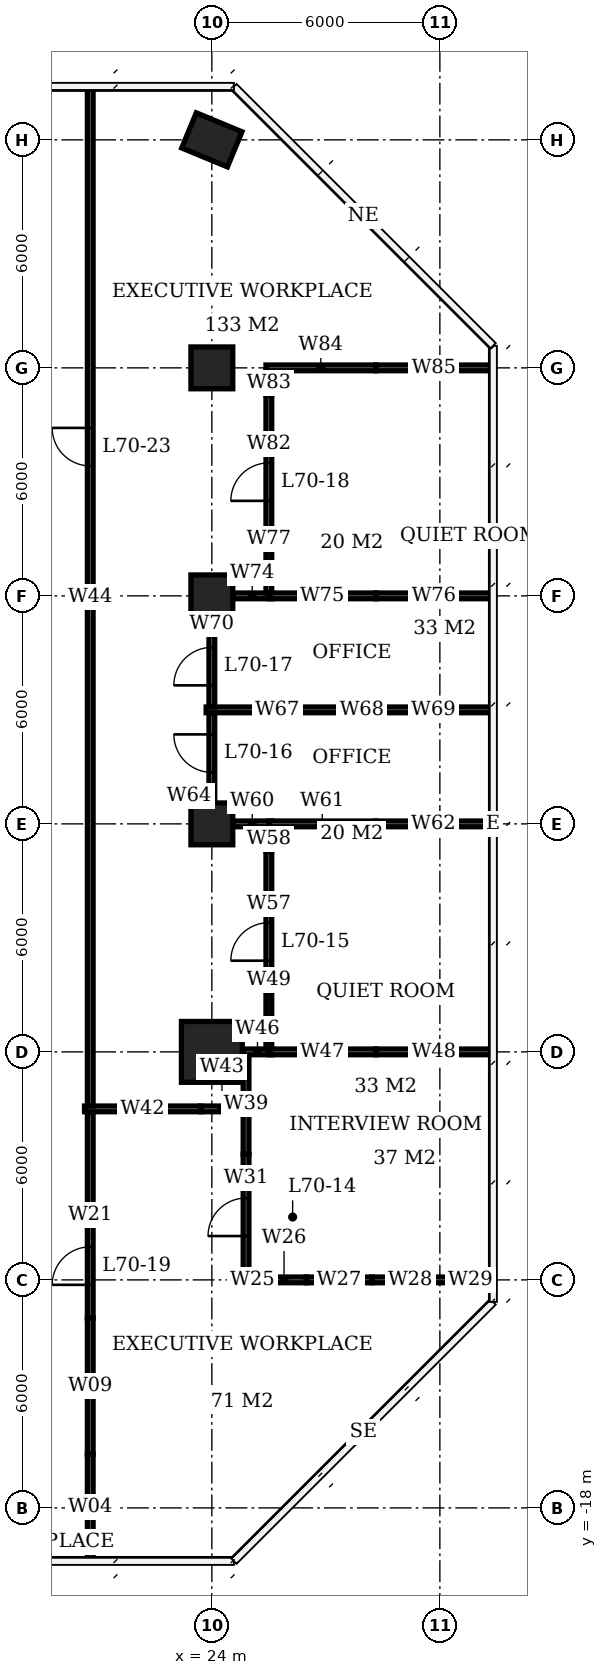
"""IFC4 building model, lengths in metres.
Left out: names, types, materials, properties, quantities, classifications, styles, units other than length and angle.
Written with IfcOpenShell. Run it as: python <this file> out.ifc"""

import sys

from ifc_helpers import new_model, si_unit, direction, frame, frame_2d, origin, origin_2d, place, context, subcontext, project, spatial, rectangle, extrude, element, fill, save


model = new_model("IFC4")
c1 = context("Model", 3, precision=1e-05, world=origin(), true_north=direction((0.0, 1.0)))
c2 = subcontext(c1, "Body", "Model", "MODEL_VIEW")
j1 = project(units=[si_unit("LENGTHUNIT", "METRE"), si_unit("PLANEANGLEUNIT", "RADIAN")], contexts=[c1])
p1 = place(None, origin())
s1 = spatial("IfcSite", under=j1, at=p1, CompositionType="ELEMENT")
p2 = place(p1, origin())
s2 = spatial("IfcBuilding", under=s1, at=p2, CompositionType="ELEMENT")
p3 = place(p2, frame((0.0, 0.0, 284.0)))
s3 = spatial("IfcBuildingStorey", under=s2, at=p3, CompositionType="ELEMENT", Elevation=284.0)
p4 = place(p3, frame((24.0, -6.0, 0.0), z_axis=(0.0, 0.0, 1.0), x_axis=(1.0, 0.0, 0.0)))
e1 = element("IfcColumn", 1, at=p4, inside=s3, PredefinedType="COLUMN", context=c2, shape_type="SweptSolid", body=[
    extrude(rectangle(XDim=1.6, YDim=1.6, at=origin_2d()), origin(), (0.0, 0.0, 1.0), 3.9),
])
for number, where, z_axis, x_axis in (
    (2, (24.0, 0.0, 0.0), (0.0, 0.0, 1.0), (1.0, 0.0, 0.0)),
    (3, (24.0, 6.0, 0.0), (0.0, 0.0, 1.0), (1.0, 0.0, 0.0)),
    (4, (24.0, 12.0, 0.0), (0.0, 0.0, 1.0), (1.0, 0.0, 0.0)),
):
    element("IfcColumn", number, at=place(p3, frame(where, z_axis=z_axis, x_axis=x_axis)), inside=s3, PredefinedType="COLUMN", context=c2, shape_type="SweptSolid", body=[
        extrude(rectangle(XDim=1.1, YDim=1.1, at=origin_2d()), origin(), (0.0, 0.0, 1.0), 3.9),
    ])
p5 = place(p3, frame((24.0, 18.0, 0.0), z_axis=(0.0, 0.0, 1.0), x_axis=(0.923879532511, -0.382683432365, 0.0)))
e5 = element("IfcColumn", 5, at=p5, inside=s3, PredefinedType="COLUMN", context=c2, shape_type="SweptSolid", body=[
    extrude(rectangle(XDim=1.3, YDim=1.0, at=origin_2d()), origin(), (0.0, 0.0, 1.0), 3.9),
])
p6 = place(p3, frame((24.825, -12.0, 0.0), z_axis=(0.0, 0.0, 1.0), x_axis=(1.0, 0.0, 0.0)))
e6 = element("IfcWall", 6, at=p6, inside=s3, PredefinedType="PARTITIONING", context=c2, shape_type="SweptSolid", body=[
    extrude(rectangle(XDim=0.485, YDim=0.15, at=frame_2d((0.243, 0.0))), origin(), (0.0, 0.0, 1.0), 3.65),
])
p7 = place(p3, frame((25.31, -12.0, 0.0), z_axis=(0.0, 0.0, 1.0), x_axis=(1.0, 0.0, 0.0)))
e7 = element("IfcWall", 7, at=p7, inside=s3, PredefinedType="PARTITIONING", context=c2, shape_type="SweptSolid", body=[
    extrude(rectangle(XDim=1.18, YDim=0.15, at=frame_2d((0.59, 0.0))), origin(), (0.0, 0.0, 1.0), 2.65),
])
p8 = place(p3, frame((26.49, -12.0, 0.0), z_axis=(0.0, 0.0, 1.0), x_axis=(1.0, 0.0, 0.0)))
e8 = element("IfcWall", 8, at=p8, inside=s3, PredefinedType="PARTITIONING", context=c2, shape_type="SweptSolid", body=[
    extrude(rectangle(XDim=1.718, YDim=0.15, at=frame_2d((0.859, 0.0))), origin(), (0.0, 0.0, 1.0), 3.65),
])
p9 = place(p3, frame((28.208, -12.0, 0.0), z_axis=(0.0, 0.0, 1.0), x_axis=(1.0, 0.0, 0.0)))
e9 = element("IfcWall", 9, at=p9, inside=s3, PredefinedType="PARTITIONING", context=c2, shape_type="SweptSolid", body=[
    extrude(rectangle(XDim=2.029, YDim=0.15, at=frame_2d((1.015, 0.0))), origin(), (0.0, 0.0, 1.0), 2.65),
])
p10 = place(p3, frame((30.237, -12.0, 0.0), z_axis=(0.0, 0.0, 1.0), x_axis=(1.0, 0.0, 0.0)))
e10 = element("IfcWall", 10, at=p10, inside=s3, PredefinedType="PARTITIONING", context=c2, shape_type="SweptSolid", body=[
    extrude(rectangle(XDim=1.138, YDim=0.15, at=frame_2d((0.569, 0.0))), origin(), (0.0, 0.0, 1.0), 3.65),
])
p11 = place(p3, frame((24.825, -6.0, 0.0), z_axis=(0.0, 0.0, 1.0), x_axis=(1.0, 0.0, 0.0)))
e11 = element("IfcWall", 11, at=p11, inside=s3, PredefinedType="PARTITIONING", context=c2, shape_type="SweptSolid", body=[
    extrude(rectangle(XDim=0.75, YDim=0.15, at=frame_2d((0.375, 0.0))), origin(), (0.0, 0.0, 1.0), 2.65),
])
p12 = place(p3, frame((25.5, -6.0, 0.0), z_axis=(0.0, 0.0, 1.0), x_axis=(1.0, 0.0, 0.0)))
e12 = element("IfcWall", 12, at=p12, inside=s3, PredefinedType="PARTITIONING", context=c2, shape_type="SweptSolid", body=[
    extrude(rectangle(XDim=2.81, YDim=0.15, at=frame_2d((1.405, 0.0))), origin(), (0.0, 0.0, 1.0), 2.65),
])
p13 = place(p3, frame((28.31, -6.0, 0.0), z_axis=(0.0, 0.0, 1.0), x_axis=(1.0, 0.0, 0.0)))
e13 = element("IfcWall", 13, at=p13, inside=s3, PredefinedType="PARTITIONING", context=c2, shape_type="SweptSolid", body=[
    extrude(rectangle(XDim=3.065, YDim=0.15, at=frame_2d((1.532, 0.0))), origin(), (0.0, 0.0, 1.0), 3.65),
])
p14 = place(p3, frame((24.55, 0.0, 0.0), z_axis=(0.0, 0.0, 1.0), x_axis=(1.0, 0.0, 0.0)))
e14 = element("IfcWall", 14, at=p14, inside=s3, PredefinedType="PARTITIONING", context=c2, shape_type="SweptSolid", body=[
    extrude(rectangle(XDim=1.025, YDim=0.15, at=frame_2d((0.512, 0.0))), origin(), (0.0, 0.0, 1.0), 2.65),
])
p15 = place(p3, frame((25.5, 0.0, 0.0), z_axis=(0.0, 0.0, 1.0), x_axis=(1.0, 0.0, 0.0)))
e15 = element("IfcWall", 15, at=p15, inside=s3, PredefinedType="PARTITIONING", context=c2, shape_type="SweptSolid", body=[
    extrude(rectangle(XDim=2.81, YDim=0.15, at=frame_2d((1.405, 0.0))), origin(), (0.0, 0.0, 1.0), 2.65),
])
p16 = place(p3, frame((28.31, 0.0, 0.0), z_axis=(0.0, 0.0, 1.0), x_axis=(1.0, 0.0, 0.0)))
e16 = element("IfcWall", 16, at=p16, inside=s3, PredefinedType="PARTITIONING", context=c2, shape_type="SweptSolid", body=[
    extrude(rectangle(XDim=3.04, YDim=0.15, at=frame_2d((1.52, 0.0))), origin(), (0.0, 0.0, 1.0), 3.65),
])
p17 = place(p3, frame((23.85, 3.0, 0.0), z_axis=(0.0, 0.0, 1.0), x_axis=(1.0, 0.0, 0.0)))
e17 = element("IfcWall", 17, at=p17, inside=s3, PredefinedType="PARTITIONING", context=c2, shape_type="SweptSolid", body=[
    extrude(rectangle(XDim=3.74, YDim=0.15, at=frame_2d((1.87, 0.0))), origin(), (0.0, 0.0, 1.0), 3.65),
])
p18 = place(p3, frame((27.59, 3.0, 0.0), z_axis=(0.0, 0.0, 1.0), x_axis=(1.0, 0.0, 0.0)))
e18 = element("IfcWall", 18, at=p18, inside=s3, PredefinedType="PARTITIONING", context=c2, shape_type="SweptSolid", body=[
    extrude(rectangle(XDim=0.72, YDim=0.15, at=frame_2d((0.36, 0.0))), origin(), (0.0, 0.0, 1.0), 2.65),
])
p19 = place(p3, frame((28.31, 3.0, 0.0), z_axis=(0.0, 0.0, 1.0), x_axis=(1.0, 0.0, 0.0)))
e19 = element("IfcWall", 19, at=p19, inside=s3, PredefinedType="PARTITIONING", context=c2, shape_type="SweptSolid", body=[
    extrude(rectangle(XDim=3.04, YDim=0.15, at=frame_2d((1.52, 0.0))), origin(), (0.0, 0.0, 1.0), 3.65),
])
p20 = place(p3, frame((24.55, 6.0, 0.0), z_axis=(0.0, 0.0, 1.0), x_axis=(1.0, 0.0, 0.0)))
e20 = element("IfcWall", 20, at=p20, inside=s3, PredefinedType="PARTITIONING", context=c2, shape_type="SweptSolid", body=[
    extrude(rectangle(XDim=1.025, YDim=0.15, at=frame_2d((0.512, 0.0))), origin(), (0.0, 0.0, 1.0), 2.65),
])
p21 = place(p3, frame((25.5, 6.0, 0.0), z_axis=(0.0, 0.0, 1.0), x_axis=(1.0, 0.0, 0.0)))
e21 = element("IfcWall", 21, at=p21, inside=s3, PredefinedType="PARTITIONING", context=c2, shape_type="SweptSolid", body=[
    extrude(rectangle(XDim=2.81, YDim=0.15, at=frame_2d((1.405, 0.0))), origin(), (0.0, 0.0, 1.0), 2.65),
])
p22 = place(p3, frame((28.31, 6.0, 0.0), z_axis=(0.0, 0.0, 1.0), x_axis=(1.0, 0.0, 0.0)))
e22 = element("IfcWall", 22, at=p22, inside=s3, PredefinedType="PARTITIONING", context=c2, shape_type="SweptSolid", body=[
    extrude(rectangle(XDim=3.065, YDim=0.15, at=frame_2d((1.532, 0.0))), origin(), (0.0, 0.0, 1.0), 3.65),
])
p23 = place(p3, frame((25.425, 12.0, 0.0), z_axis=(0.0, 0.0, 1.0), x_axis=(1.0, 0.0, 0.0)))
e23 = element("IfcWall", 23, at=p23, inside=s3, PredefinedType="PARTITIONING", context=c2, shape_type="SweptSolid", body=[
    extrude(rectangle(XDim=2.885, YDim=0.15, at=frame_2d((1.442, 0.0))), origin(), (0.0, 0.0, 1.0), 2.65),
])
p24 = place(p3, frame((28.31, 12.0, 0.0), z_axis=(0.0, 0.0, 1.0), x_axis=(1.0, 0.0, 0.0)))
e24 = element("IfcWall", 24, at=p24, inside=s3, PredefinedType="PARTITIONING", context=c2, shape_type="SweptSolid", body=[
    extrude(rectangle(XDim=3.065, YDim=0.15, at=frame_2d((1.532, 0.0))), origin(), (0.0, 0.0, 1.0), 3.65),
])
p25 = place(p3, frame((24.0, 0.56, 0.0), z_axis=(0.0, 0.0, 1.0), x_axis=(0.0, 1.0, 0.0)))
e25 = element("IfcWall", 25, at=p25, inside=s3, PredefinedType="PARTITIONING", context=c2, shape_type="SweptSolid", body=[
    extrude(rectangle(XDim=2.365, YDim=0.15, at=frame_2d((1.183, 0.0))), origin(), (0.0, 0.0, 1.0), 3.65),
])
p26 = place(p25, frame((0.795, 0.0, 0.0)))
e26 = element("IfcOpeningElement", 26, at=p26, cuts=e25, PredefinedType="OPENING", context=c2, shape_type="SweptSolid", body=[
    extrude(rectangle(XDim=1.0, YDim=2.4, at=frame_2d((0.5, 1.2))), frame((0.0, 0.085, 0.0), z_axis=(0.0, -1.0, 0.0), x_axis=(1.0, 0.0, 0.0)), (0.0, 0.0, 1.0), 0.17),
])
p27 = place(p3, frame((24.0, 3.075, 0.0), z_axis=(0.0, 0.0, 1.0), x_axis=(0.0, 1.0, 0.0)))
e27 = element("IfcWall", 27, at=p27, inside=s3, PredefinedType="PARTITIONING", context=c2, shape_type="SweptSolid", body=[
    extrude(rectangle(XDim=2.365, YDim=0.15, at=frame_2d((1.183, 0.0))), origin(), (0.0, 0.0, 1.0), 3.65),
])
p28 = place(p27, frame((0.57, 0.0, 0.0)))
e28 = element("IfcOpeningElement", 28, at=p28, cuts=e27, PredefinedType="OPENING", context=c2, shape_type="SweptSolid", body=[
    extrude(rectangle(XDim=1.0, YDim=2.4, at=frame_2d((0.5, 1.2))), frame((0.0, 0.085, 0.0), z_axis=(0.0, -1.0, 0.0), x_axis=(1.0, 0.0, 0.0)), (0.0, 0.0, 1.0), 0.17),
])
p29 = place(p3, frame((24.9, -11.925, 0.0), z_axis=(0.0, 0.0, 1.0), x_axis=(0.0, 1.0, 0.0)))
e29 = element("IfcWall", 29, at=p29, inside=s3, PredefinedType="PARTITIONING", context=c2, shape_type="SweptSolid", body=[
    extrude(rectangle(XDim=3.233, YDim=0.15, at=frame_2d((1.616, 0.0))), origin(), (0.0, 0.0, 1.0), 3.65),
])
p30 = place(p29, frame((1.079, 0.0, 0.0)))
e30 = element("IfcOpeningElement", 30, at=p30, cuts=e29, PredefinedType="OPENING", context=c2, shape_type="SweptSolid", body=[
    extrude(rectangle(XDim=1.0, YDim=2.4, at=frame_2d((0.5, 1.2))), frame((0.0, 0.085, 0.0), z_axis=(0.0, -1.0, 0.0), x_axis=(1.0, 0.0, 0.0)), (0.0, 0.0, 1.0), 0.17),
])
p31 = place(p3, frame((24.9, -8.692, 0.0), z_axis=(0.0, 0.0, 1.0), x_axis=(0.0, 1.0, 0.0)))
e31 = element("IfcWall", 31, at=p31, inside=s3, PredefinedType="PARTITIONING", context=c2, shape_type="SweptSolid", body=[
    extrude(rectangle(XDim=2.617, YDim=0.15, at=frame_2d((1.309, 0.0))), origin(), (0.0, 0.0, 1.0), 2.65),
])
p32 = place(p3, frame((25.5, -5.925, 0.0), z_axis=(0.0, 0.0, 1.0), x_axis=(0.0, 1.0, 0.0)))
e32 = element("IfcWall", 32, at=p32, inside=s3, PredefinedType="PARTITIONING", context=c2, shape_type="SweptSolid", body=[
    extrude(rectangle(XDim=0.435, YDim=0.15, at=frame_2d((0.218, 0.0))), origin(), (0.0, 0.0, 1.0), 2.65),
])
p33 = place(p3, frame((25.5, -5.49, 0.0), z_axis=(0.0, 0.0, 1.0), x_axis=(0.0, 1.0, 0.0)))
e33 = element("IfcWall", 33, at=p33, inside=s3, PredefinedType="PARTITIONING", context=c2, shape_type="SweptSolid", body=[
    extrude(rectangle(XDim=4.78, YDim=0.15, at=frame_2d((2.39, 0.0))), origin(), (0.0, 0.0, 1.0), 3.65),
])
p34 = place(p33, frame((1.89, 0.0, 0.0)))
e34 = element("IfcOpeningElement", 34, at=p34, cuts=e33, PredefinedType="OPENING", context=c2, shape_type="SweptSolid", body=[
    extrude(rectangle(XDim=1.0, YDim=2.4, at=frame_2d((0.5, 1.2))), frame((0.0, 0.085, 0.0), z_axis=(0.0, -1.0, 0.0), x_axis=(1.0, 0.0, 0.0)), (0.0, 0.0, 1.0), 0.17),
])
for number, where, z_axis, x_axis in (
    (35, (25.5, -0.71, 0.0), (0.0, 0.0, 1.0), (0.0, 1.0, 0.0)),
    (36, (25.5, 6.075, 0.0), (0.0, 0.0, 1.0), (0.0, 1.0, 0.0)),
):
    element("IfcWall", number, at=place(p3, frame(where, z_axis=z_axis, x_axis=x_axis)), inside=s3, PredefinedType="PARTITIONING", context=c2, shape_type="SweptSolid", body=[
        extrude(rectangle(XDim=0.635, YDim=0.15, at=frame_2d((0.317, 0.0))), origin(), (0.0, 0.0, 1.0), 2.65),
    ])
p35 = place(p3, frame((25.5, 6.71, 0.0), z_axis=(0.0, 0.0, 1.0), x_axis=(0.0, 1.0, 0.0)))
e37 = element("IfcWall", 37, at=p35, inside=s3, PredefinedType="PARTITIONING", context=c2, shape_type="SweptSolid", body=[
    extrude(rectangle(XDim=4.58, YDim=0.15, at=frame_2d((2.29, 0.0))), origin(), (0.0, 0.0, 1.0), 3.65),
])
p36 = place(p35, frame((1.79, 0.0, 0.0)))
e38 = element("IfcOpeningElement", 38, at=p36, cuts=e37, PredefinedType="OPENING", context=c2, shape_type="SweptSolid", body=[
    extrude(rectangle(XDim=1.0, YDim=2.4, at=frame_2d((0.5, 1.2))), frame((0.0, 0.085, 0.0), z_axis=(0.0, -1.0, 0.0), x_axis=(1.0, 0.0, 0.0)), (0.0, 0.0, 1.0), 0.17),
])
p37 = place(p3, frame((25.5, 11.29, 0.0), z_axis=(0.0, 0.0, 1.0), x_axis=(0.0, 1.0, 0.0)))
e39 = element("IfcWall", 39, at=p37, inside=s3, PredefinedType="PARTITIONING", context=c2, shape_type="SweptSolid", body=[
    extrude(rectangle(XDim=0.635, YDim=0.15, at=frame_2d((0.317, 0.0))), origin(), (0.0, 0.0, 1.0), 2.65),
])
p38 = place(p3, frame((20.8, -19.375, 0.0), z_axis=(0.0, 0.0, 1.0), x_axis=(0.0, 1.0, 0.0)))
e40 = element("IfcWall", 40, at=p38, inside=s3, PredefinedType="PARTITIONING", context=c2, shape_type="SweptSolid", body=[
    extrude(rectangle(XDim=2.783, YDim=0.15, at=frame_2d((1.392, 0.0))), origin(), (0.0, 0.0, 1.0), 3.65),
])
p39 = place(p3, frame((20.8, -16.592, 0.0), z_axis=(0.0, 0.0, 1.0), x_axis=(0.0, 1.0, 0.0)))
e41 = element("IfcWall", 41, at=p39, inside=s3, PredefinedType="PARTITIONING", context=c2, shape_type="SweptSolid", body=[
    extrude(rectangle(XDim=3.584, YDim=0.15, at=frame_2d((1.792, 0.0))), origin(), (0.0, 0.0, 1.0), 2.65),
])
p40 = place(p3, frame((20.8, -13.008, 0.0), z_axis=(0.0, 0.0, 1.0), x_axis=(0.0, 1.0, 0.0)))
e42 = element("IfcWall", 42, at=p40, inside=s3, PredefinedType="PARTITIONING", context=c2, shape_type="SweptSolid", body=[
    extrude(rectangle(XDim=5.433, YDim=0.15, at=frame_2d((2.716, 0.0))), origin(), (0.0, 0.0, 1.0), 3.65),
])
p41 = place(p40, frame((0.878, 0.0, 0.0)))
e43 = element("IfcOpeningElement", 43, at=p41, cuts=e42, PredefinedType="OPENING", context=c2, shape_type="SweptSolid", body=[
    extrude(rectangle(XDim=1.0, YDim=2.4, at=frame_2d((0.5, 1.2))), frame((0.0, 0.085, 0.0), z_axis=(0.0, -1.0, 0.0), x_axis=(1.0, 0.0, 0.0)), (0.0, 0.0, 1.0), 0.17),
])
p42 = place(p3, frame((20.8, -7.425, 0.0), z_axis=(0.0, 0.0, 1.0), x_axis=(0.0, 1.0, 0.0)))
e44 = element("IfcWall", 44, at=p42, inside=s3, PredefinedType="PARTITIONING", context=c2, shape_type="SweptSolid", body=[
    extrude(rectangle(XDim=26.8, YDim=0.15, at=frame_2d((13.4, 0.0))), origin(), (0.0, 0.0, 1.0), 3.65),
])
p43 = place(p42, frame((16.845, 0.0, 0.0)))
e45 = element("IfcOpeningElement", 45, at=p43, cuts=e44, PredefinedType="OPENING", context=c2, shape_type="SweptSolid", body=[
    extrude(rectangle(XDim=1.0, YDim=2.4, at=frame_2d((0.5, 1.2))), frame((0.0, 0.085, 0.0), z_axis=(0.0, -1.0, 0.0), x_axis=(1.0, 0.0, 0.0)), (0.0, 0.0, 1.0), 0.17),
])
p44 = place(p3, frame((20.65, -7.5, 0.0), z_axis=(0.0, 0.0, 1.0), x_axis=(1.0, 0.0, 0.0)))
e46 = element("IfcWall", 46, at=p44, inside=s3, PredefinedType="PARTITIONING", context=c2, shape_type="SweptSolid", body=[
    extrude(rectangle(XDim=3.058, YDim=0.15, at=frame_2d((1.529, 0.0))), origin(), (0.0, 0.0, 1.0), 3.65),
])
p45 = place(p3, frame((23.708, -7.5, 0.0), z_axis=(0.0, 0.0, 1.0), x_axis=(1.0, 0.0, 0.0)))
e47 = element("IfcWall", 47, at=p45, inside=s3, PredefinedType="PARTITIONING", context=c2, shape_type="SweptSolid", body=[
    extrude(rectangle(XDim=1.117, YDim=0.15, at=frame_2d((0.559, 0.0))), origin(), (0.0, 0.0, 1.0), 2.65),
])
p46 = place(p30, origin())
e48 = element("IfcDoor", 48, at=p46, inside=s3, OperationType="SINGLE_SWING_LEFT", PredefinedType="DOOR", context=c2, shape_type="SweptSolid", body=[
    extrude(rectangle(XDim=1.0, YDim=2.4, at=frame_2d((0.5, 1.2))), frame((0.0, 0.025, 0.0), z_axis=(0.0, -1.0, 0.0), x_axis=(1.0, 0.0, 0.0)), (0.0, 0.0, 1.0), 0.05),
])
fill(e30, e48)
p47 = place(p34, origin())
e49 = element("IfcDoor", 49, at=p47, inside=s3, OperationType="SINGLE_SWING_LEFT", PredefinedType="DOOR", context=c2, shape_type="SweptSolid", body=[
    extrude(rectangle(XDim=1.0, YDim=2.4, at=frame_2d((0.5, 1.2))), frame((0.0, 0.025, 0.0), z_axis=(0.0, -1.0, 0.0), x_axis=(1.0, 0.0, 0.0)), (0.0, 0.0, 1.0), 0.05),
])
fill(e34, e49)
p48 = place(p26, origin())
e50 = element("IfcDoor", 50, at=p48, inside=s3, OperationType="SINGLE_SWING_RIGHT", PredefinedType="DOOR", context=c2, shape_type="SweptSolid", body=[
    extrude(rectangle(XDim=1.0, YDim=2.4, at=frame_2d((0.5, 1.2))), frame((0.0, 0.025, 0.0), z_axis=(0.0, -1.0, 0.0), x_axis=(1.0, 0.0, 0.0)), (0.0, 0.0, 1.0), 0.05),
])
fill(e26, e50)
p49 = place(p28, origin())
e51 = element("IfcDoor", 51, at=p49, inside=s3, OperationType="SINGLE_SWING_LEFT", PredefinedType="DOOR", context=c2, shape_type="SweptSolid", body=[
    extrude(rectangle(XDim=1.0, YDim=2.4, at=frame_2d((0.5, 1.2))), frame((0.0, 0.025, 0.0), z_axis=(0.0, -1.0, 0.0), x_axis=(1.0, 0.0, 0.0)), (0.0, 0.0, 1.0), 0.05),
])
fill(e28, e51)
p50 = place(p36, origin())
e52 = element("IfcDoor", 52, at=p50, inside=s3, OperationType="SINGLE_SWING_LEFT", PredefinedType="DOOR", context=c2, shape_type="SweptSolid", body=[
    extrude(rectangle(XDim=1.0, YDim=2.4, at=frame_2d((0.5, 1.2))), frame((0.0, 0.025, 0.0), z_axis=(0.0, -1.0, 0.0), x_axis=(1.0, 0.0, 0.0)), (0.0, 0.0, 1.0), 0.05),
])
fill(e38, e52)
p51 = place(p41, origin())
e53 = element("IfcDoor", 53, at=p51, inside=s3, OperationType="SINGLE_SWING_LEFT", PredefinedType="DOOR", context=c2, shape_type="SweptSolid", body=[
    extrude(rectangle(XDim=1.0, YDim=2.4, at=frame_2d((0.5, 1.2))), frame((0.0, 0.025, 0.0), z_axis=(0.0, -1.0, 0.0), x_axis=(1.0, 0.0, 0.0)), (0.0, 0.0, 1.0), 0.05),
])
fill(e43, e53)
p52 = place(p43, origin())
e54 = element("IfcDoor", 54, at=p52, inside=s3, OperationType="SINGLE_SWING_RIGHT", PredefinedType="DOOR", context=c2, shape_type="SweptSolid", body=[
    extrude(rectangle(XDim=1.0, YDim=2.4, at=frame_2d((0.5, 1.2))), frame((0.0, 0.025, 0.0), z_axis=(0.0, -1.0, 0.0), x_axis=(1.0, 0.0, 0.0)), (0.0, 0.0, 1.0), 0.05),
])
fill(e45, e54)
save(model, sys.argv[1])
